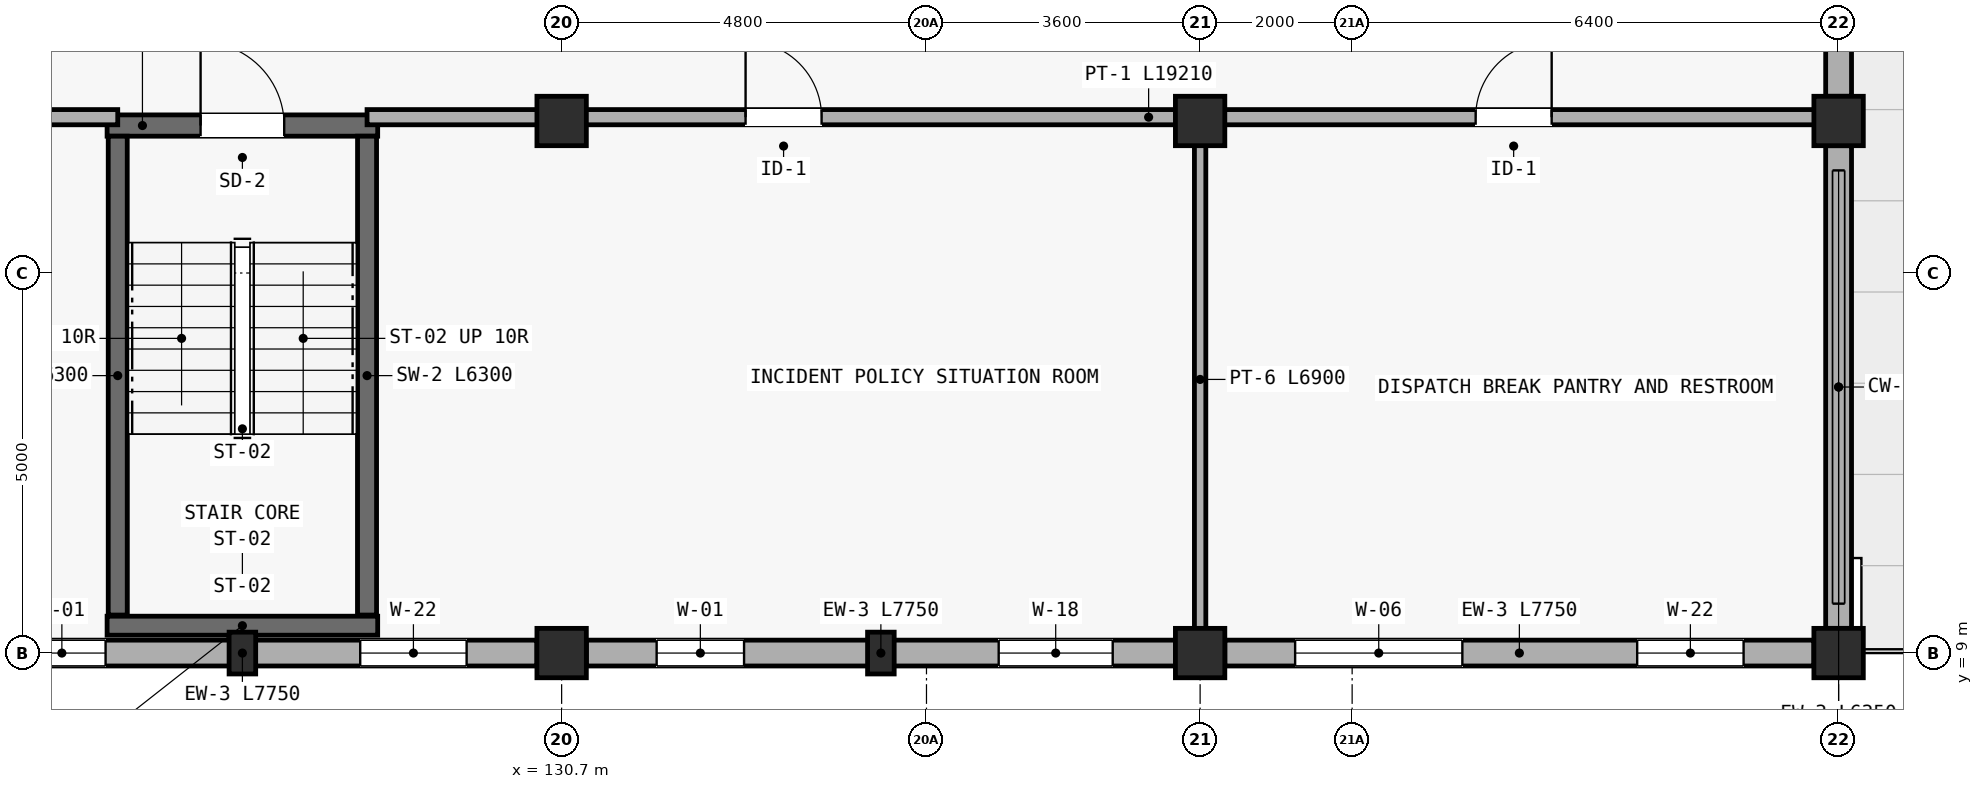
"""IFC4 building model, lengths in metres.
Left out: names, types, materials, properties, quantities, classifications, styles, units other than length and angle.
Written with IfcOpenShell. Run it as: python <this file> out.ifc"""

import sys

from ifc_helpers import new_model, si_unit, direction, frame, frame_2d, origin, origin_2d, place, context, subcontext, project, spatial, rectangle, extrude, element, fill, save


model = new_model("IFC4")
c1 = context("Model", 3, precision=1e-05, world=origin(), true_north=direction((0.0, 1.0)))
c2 = subcontext(c1, "Body", "Model", "MODEL_VIEW")
j1 = project(units=[si_unit("LENGTHUNIT", "METRE"), si_unit("PLANEANGLEUNIT", "RADIAN")], contexts=[c1])
p1 = place(None, origin())
s1 = spatial("IfcSite", under=j1, at=p1, CompositionType="ELEMENT")
p2 = place(p1, origin())
s2 = spatial("IfcBuilding", under=s1, at=p2, CompositionType="ELEMENT")
p3 = place(p2, frame((0.0, 0.0, 9.3)))
s3 = spatial("IfcBuildingStorey", under=s2, at=p3, CompositionType="ELEMENT", Elevation=9.3)
for number, where, z_axis, x_axis in (
    (1, (130.7, 9.0, 0.0), (0.0, 0.0, 1.0), (1.0, 0.0, 0.0)),
    (2, (130.7, 16.0, 0.0), (0.0, 0.0, 1.0), (1.0, 0.0, 0.0)),
    (3, (139.1, 9.0, 0.0), (0.0, 0.0, 1.0), (1.0, 0.0, 0.0)),
    (4, (139.1, 16.0, 0.0), (0.0, 0.0, 1.0), (1.0, 0.0, 0.0)),
    (5, (147.5, 9.0, 0.0), (0.0, 0.0, 1.0), (1.0, 0.0, 0.0)),
    (6, (147.5, 16.0, 0.0), (0.0, 0.0, 1.0), (1.0, 0.0, 0.0)),
):
    element("IfcColumn", number, at=place(p3, frame(where, z_axis=z_axis, x_axis=x_axis)), inside=s3, PredefinedType="COLUMN", context=c2, shape_type="SweptSolid", body=[
        extrude(rectangle(XDim=0.65, YDim=0.65, at=origin_2d()), origin(), (0.0, 0.0, 1.0), 3.45),
    ])
for number, where, z_axis, x_axis in (
    (7, (126.5, 9.0, 0.0), (0.0, 0.0, 1.0), (1.0, 0.0, 0.0)),
    (8, (134.9, 9.0, 0.0), (0.0, 0.0, 1.0), (1.0, 0.0, 0.0)),
):
    element("IfcColumn", number, at=place(p3, frame(where, z_axis=z_axis, x_axis=x_axis)), inside=s3, PredefinedType="PILASTER", context=c2, shape_type="SweptSolid", body=[
        extrude(rectangle(XDim=0.35, YDim=0.55, at=origin_2d()), origin(), (0.0, 0.0, 1.0), 3.45),
    ])
p4 = place(p3, frame((122.625, 9.0, 0.0), z_axis=(0.0, 0.0, 1.0), x_axis=(1.0, 0.0, 0.0)))
e9 = element("IfcWall", 9, at=p4, inside=s3, PredefinedType="STANDARD", context=c2, shape_type="SweptSolid", body=[
    extrude(rectangle(XDim=7.75, YDim=0.34, at=frame_2d((3.875, 0.0))), origin(), (0.0, 0.0, 1.0), 2.69),
])
p5 = place(p4, frame((0.925, 0.0, 0.75)))
e10 = element("IfcOpeningElement", 10, at=p5, cuts=e9, PredefinedType="OPENING", context=c2, shape_type="SweptSolid", body=[
    extrude(rectangle(XDim=1.15, YDim=1.45, at=frame_2d((0.575, 0.725))), frame((0.0, 0.18, 0.0), z_axis=(0.0, -1.0, 0.0), x_axis=(1.0, 0.0, 0.0)), (0.0, 0.0, 1.0), 0.36),
])
p6 = place(p4, frame((5.425, 0.0, 0.75)))
e11 = element("IfcOpeningElement", 11, at=p6, cuts=e9, PredefinedType="OPENING", context=c2, shape_type="SweptSolid", body=[
    extrude(rectangle(XDim=1.4, YDim=1.45, at=frame_2d((0.7, 0.725))), frame((0.0, 0.18, 0.0), z_axis=(0.0, -1.0, 0.0), x_axis=(1.0, 0.0, 0.0)), (0.0, 0.0, 1.0), 0.36),
])
p7 = place(p3, frame((131.025, 9.0, 0.0), z_axis=(0.0, 0.0, 1.0), x_axis=(1.0, 0.0, 0.0)))
e12 = element("IfcWall", 12, at=p7, inside=s3, PredefinedType="STANDARD", context=c2, shape_type="SweptSolid", body=[
    extrude(rectangle(XDim=7.75, YDim=0.34, at=frame_2d((3.875, 0.0))), origin(), (0.0, 0.0, 1.0), 2.69),
])
p8 = place(p7, frame((0.925, 0.0, 0.75)))
e13 = element("IfcOpeningElement", 13, at=p8, cuts=e12, PredefinedType="OPENING", context=c2, shape_type="SweptSolid", body=[
    extrude(rectangle(XDim=1.15, YDim=1.45, at=frame_2d((0.575, 0.725))), frame((0.0, 0.18, 0.0), z_axis=(0.0, -1.0, 0.0), x_axis=(1.0, 0.0, 0.0)), (0.0, 0.0, 1.0), 0.36),
])
p9 = place(p7, frame((5.425, 0.0, 0.75)))
e14 = element("IfcOpeningElement", 14, at=p9, cuts=e12, PredefinedType="OPENING", context=c2, shape_type="SweptSolid", body=[
    extrude(rectangle(XDim=1.5, YDim=1.4, at=frame_2d((0.75, 0.7))), frame((0.0, 0.18, 0.0), z_axis=(0.0, -1.0, 0.0), x_axis=(1.0, 0.0, 0.0)), (0.0, 0.0, 1.0), 0.36),
])
p10 = place(p3, frame((139.425, 9.0, 0.0), z_axis=(0.0, 0.0, 1.0), x_axis=(1.0, 0.0, 0.0)))
e15 = element("IfcWall", 15, at=p10, inside=s3, PredefinedType="STANDARD", context=c2, shape_type="SweptSolid", body=[
    extrude(rectangle(XDim=7.75, YDim=0.34, at=frame_2d((3.875, 0.0))), origin(), (0.0, 0.0, 1.0), 2.69),
])
p11 = place(p10, frame((0.925, 0.0, 0.75)))
e16 = element("IfcOpeningElement", 16, at=p11, cuts=e15, PredefinedType="OPENING", context=c2, shape_type="SweptSolid", body=[
    extrude(rectangle(XDim=2.2, YDim=1.45, at=frame_2d((1.1, 0.725))), frame((0.0, 0.18, 0.0), z_axis=(0.0, -1.0, 0.0), x_axis=(1.0, 0.0, 0.0)), (0.0, 0.0, 1.0), 0.36),
])
p12 = place(p10, frame((5.425, 0.0, 0.75)))
e17 = element("IfcOpeningElement", 17, at=p12, cuts=e15, PredefinedType="OPENING", context=c2, shape_type="SweptSolid", body=[
    extrude(rectangle(XDim=1.4, YDim=1.45, at=frame_2d((0.7, 0.725))), frame((0.0, 0.18, 0.0), z_axis=(0.0, -1.0, 0.0), x_axis=(1.0, 0.0, 0.0)), (0.0, 0.0, 1.0), 0.36),
])
p13 = place(p3, frame((147.5, 9.325, 0.0), z_axis=(0.0, 0.0, 1.0), x_axis=(0.0, 1.0, 0.0)))
e18 = element("IfcWall", 18, at=p13, inside=s3, PredefinedType="STANDARD", context=c2, shape_type="SweptSolid", body=[
    extrude(rectangle(XDim=6.35, YDim=0.34, at=frame_2d((3.175, 0.0))), origin(), (0.0, 0.0, 1.0), 2.75),
])
p14 = place(p3, frame((147.5, 16.325, 0.0), z_axis=(0.0, 0.0, 1.0), x_axis=(0.0, 1.0, 0.0)))
e19 = element("IfcWall", 19, at=p14, inside=s3, PredefinedType="STANDARD", context=c2, shape_type="SweptSolid", body=[
    extrude(rectangle(XDim=7.85, YDim=0.34, at=frame_2d((3.925, 0.0))), origin(), (0.0, 0.0, 1.0), 2.75),
])
p15 = place(p14, frame((0.775, 0.0, 0.0)))
e20 = element("IfcOpeningElement", 20, at=p15, cuts=e19, PredefinedType="OPENING", context=c2, shape_type="SweptSolid", body=[
    extrude(rectangle(XDim=1.08, YDim=2.1, at=frame_2d((0.54, 1.05))), frame((0.0, 0.18, 0.0), z_axis=(0.0, -1.0, 0.0), x_axis=(1.0, 0.0, 0.0)), (0.0, 0.0, 1.0), 0.36),
])
p16 = place(p14, frame((3.925, 0.0, 0.75)))
e21 = element("IfcOpeningElement", 21, at=p16, cuts=e19, PredefinedType="OPENING", context=c2, shape_type="SweptSolid", body=[
    extrude(rectangle(XDim=1.75, YDim=1.55, at=frame_2d((0.875, 0.775))), frame((0.0, 0.18, 0.0), z_axis=(0.0, -1.0, 0.0), x_axis=(1.0, 0.0, 0.0)), (0.0, 0.0, 1.0), 0.36),
])
p17 = place(p3, frame((124.72, 15.94, 0.0), z_axis=(0.0, 0.0, 1.0), x_axis=(1.0, 0.0, 0.0)))
e22 = element("IfcWall", 22, at=p17, inside=s3, PredefinedType="SHEAR", context=c2, shape_type="SweptSolid", body=[
    extrude(rectangle(XDim=3.56, YDim=0.28, at=frame_2d((1.78, 0.0))), origin(), (0.0, 0.0, 1.0), 3.2),
])
p18 = place(p17, frame((1.23, 0.0, 0.0)))
e23 = element("IfcOpeningElement", 23, at=p18, cuts=e22, PredefinedType="OPENING", context=c2, shape_type="SweptSolid", body=[
    extrude(rectangle(XDim=1.1, YDim=2.15, at=frame_2d((0.55, 1.075))), frame((0.0, 0.15, 0.0), z_axis=(0.0, -1.0, 0.0), x_axis=(1.0, 0.0, 0.0)), (0.0, 0.0, 1.0), 0.3),
])
p19 = place(p3, frame((128.28, 9.36, 0.0), z_axis=(0.0, 0.0, 1.0), x_axis=(-1.0, 0.0, 0.0)))
e24 = element("IfcWall", 24, at=p19, inside=s3, PredefinedType="SHEAR", context=c2, shape_type="SweptSolid", body=[
    extrude(rectangle(XDim=3.56, YDim=0.25, at=frame_2d((1.78, 0.0))), origin(), (0.0, 0.0, 1.0), 3.2),
])
for number, where, z_axis, x_axis in (
    (25, (124.86, 15.8, 0.0), (0.0, 0.0, 1.0), (0.0, -1.0, 0.0)),
    (26, (128.14, 9.5, 0.0), (0.0, 0.0, 1.0), (0.0, 1.0, 0.0)),
):
    element("IfcWall", number, at=place(p3, frame(where, z_axis=z_axis, x_axis=x_axis)), inside=s3, PredefinedType="SHEAR", context=c2, shape_type="SweptSolid", body=[
        extrude(rectangle(XDim=6.3, YDim=0.25, at=frame_2d((3.15, 0.0))), origin(), (0.0, 0.0, 1.0), 3.2),
    ])
p20 = place(p3, frame((121.13, 16.05, 0.0), z_axis=(0.0, 0.0, 1.0), x_axis=(1.0, 0.0, 0.0)))
e27 = element("IfcWall", 27, at=p20, inside=s3, PredefinedType="PARTITIONING", context=c2, shape_type="SweptSolid", body=[
    extrude(rectangle(XDim=3.73, YDim=0.2, at=frame_2d((1.865, 0.0))), origin(), (0.0, 0.0, 1.0), 2.7),
])
p21 = place(p3, frame((128.14, 16.05, 0.0), z_axis=(0.0, 0.0, 1.0), x_axis=(1.0, 0.0, 0.0)))
e28 = element("IfcWall", 28, at=p21, inside=s3, PredefinedType="PARTITIONING", context=c2, shape_type="SweptSolid", body=[
    extrude(rectangle(XDim=10.96, YDim=0.2, at=frame_2d((5.48, 0.0))), origin(), (0.0, 0.0, 1.0), 2.7),
])
p22 = place(p21, frame((4.98, 0.0, 0.0)))
e29 = element("IfcOpeningElement", 29, at=p22, cuts=e28, PredefinedType="OPENING", context=c2, shape_type="SweptSolid", body=[
    extrude(rectangle(XDim=1.0, YDim=2.12, at=frame_2d((0.5, 1.06))), frame((0.0, 0.11, 0.0), z_axis=(0.0, -1.0, 0.0), x_axis=(1.0, 0.0, 0.0)), (0.0, 0.0, 1.0), 0.22),
])
p23 = place(p3, frame((139.1, 16.05, 0.0), z_axis=(0.0, 0.0, 1.0), x_axis=(1.0, 0.0, 0.0)))
e30 = element("IfcWall", 30, at=p23, inside=s3, PredefinedType="PARTITIONING", context=c2, shape_type="SweptSolid", body=[
    extrude(rectangle(XDim=8.25, YDim=0.2, at=frame_2d((4.125, 0.0))), origin(), (0.0, 0.0, 1.0), 2.7),
])
p24 = place(p23, frame((3.625, 0.0, 0.0)))
e31 = element("IfcOpeningElement", 31, at=p24, cuts=e30, PredefinedType="OPENING", context=c2, shape_type="SweptSolid", body=[
    extrude(rectangle(XDim=1.0, YDim=2.12, at=frame_2d((0.5, 1.06))), frame((0.0, 0.11, 0.0), z_axis=(0.0, -1.0, 0.0), x_axis=(1.0, 0.0, 0.0)), (0.0, 0.0, 1.0), 0.22),
])
p25 = place(p3, frame((139.1, 9.15, 0.0), z_axis=(0.0, 0.0, 1.0), x_axis=(0.0, 1.0, 0.0)))
e32 = element("IfcWall", 32, at=p25, inside=s3, PredefinedType="PARTITIONING", context=c2, shape_type="SweptSolid", body=[
    extrude(rectangle(XDim=6.9, YDim=0.15, at=frame_2d((3.45, 0.0))), origin(), (0.0, 0.0, 1.0), 2.7),
])
p26 = place(p5, origin())
e33 = element("IfcWindow", 33, at=p26, inside=s3, PartitioningType="SINGLE_PANEL", PredefinedType="WINDOW", context=c2, shape_type="SweptSolid", body=[
    extrude(rectangle(XDim=1.15, YDim=1.45, at=frame_2d((0.575, 0.725))), frame((0.0, 0.03, 0.0), z_axis=(0.0, -1.0, 0.0), x_axis=(1.0, 0.0, 0.0)), (0.0, 0.0, 1.0), 0.06),
])
fill(e10, e33)
p27 = place(p6, origin())
e34 = element("IfcWindow", 34, at=p27, inside=s3, PartitioningType="DOUBLE_PANEL_VERTICAL", PredefinedType="WINDOW", context=c2, shape_type="SweptSolid", body=[
    extrude(rectangle(XDim=1.4, YDim=1.45, at=frame_2d((0.7, 0.725))), frame((0.0, 0.03, 0.0), z_axis=(0.0, -1.0, 0.0), x_axis=(1.0, 0.0, 0.0)), (0.0, 0.0, 1.0), 0.06),
])
fill(e11, e34)
p28 = place(p8, origin())
e35 = element("IfcWindow", 35, at=p28, inside=s3, PartitioningType="SINGLE_PANEL", PredefinedType="WINDOW", context=c2, shape_type="SweptSolid", body=[
    extrude(rectangle(XDim=1.15, YDim=1.45, at=frame_2d((0.575, 0.725))), frame((0.0, 0.03, 0.0), z_axis=(0.0, -1.0, 0.0), x_axis=(1.0, 0.0, 0.0)), (0.0, 0.0, 1.0), 0.06),
])
fill(e13, e35)
p29 = place(p9, origin())
e36 = element("IfcWindow", 36, at=p29, inside=s3, PartitioningType="DOUBLE_PANEL_VERTICAL", PredefinedType="WINDOW", context=c2, shape_type="SweptSolid", body=[
    extrude(rectangle(XDim=1.5, YDim=1.4, at=frame_2d((0.75, 0.7))), frame((0.0, 0.03, 0.0), z_axis=(0.0, -1.0, 0.0), x_axis=(1.0, 0.0, 0.0)), (0.0, 0.0, 1.0), 0.06),
])
fill(e14, e36)
p30 = place(p11, origin())
e37 = element("IfcWindow", 37, at=p30, inside=s3, PartitioningType="TRIPLE_PANEL_VERTICAL", PredefinedType="WINDOW", context=c2, shape_type="SweptSolid", body=[
    extrude(rectangle(XDim=2.2, YDim=1.45, at=frame_2d((1.1, 0.725))), frame((0.0, 0.03, 0.0), z_axis=(0.0, -1.0, 0.0), x_axis=(1.0, 0.0, 0.0)), (0.0, 0.0, 1.0), 0.06),
])
fill(e16, e37)
p31 = place(p12, origin())
e38 = element("IfcWindow", 38, at=p31, inside=s3, PartitioningType="DOUBLE_PANEL_VERTICAL", PredefinedType="WINDOW", context=c2, shape_type="SweptSolid", body=[
    extrude(rectangle(XDim=1.4, YDim=1.45, at=frame_2d((0.7, 0.725))), frame((0.0, 0.03, 0.0), z_axis=(0.0, -1.0, 0.0), x_axis=(1.0, 0.0, 0.0)), (0.0, 0.0, 1.0), 0.06),
])
fill(e17, e38)
p32 = place(p18, origin())
e39 = element("IfcDoor", 39, at=p32, inside=s3, OperationType="SINGLE_SWING_LEFT", PredefinedType="DOOR", context=c2, shape_type="SweptSolid", body=[
    extrude(rectangle(XDim=1.1, YDim=2.15, at=frame_2d((0.55, 1.075))), frame((0.0, 0.025, 0.0), z_axis=(0.0, -1.0, 0.0), x_axis=(1.0, 0.0, 0.0)), (0.0, 0.0, 1.0), 0.05),
])
fill(e23, e39)
p33 = place(p22, origin())
e40 = element("IfcDoor", 40, at=p33, inside=s3, OperationType="SINGLE_SWING_LEFT", PredefinedType="DOOR", context=c2, shape_type="SweptSolid", body=[
    extrude(rectangle(XDim=1.0, YDim=2.12, at=frame_2d((0.5, 1.06))), frame((0.0, 0.025, 0.0), z_axis=(0.0, -1.0, 0.0), x_axis=(1.0, 0.0, 0.0)), (0.0, 0.0, 1.0), 0.05),
])
fill(e29, e40)
p34 = place(p24, origin())
e41 = element("IfcDoor", 41, at=p34, inside=s3, OperationType="SINGLE_SWING_RIGHT", PredefinedType="DOOR", context=c2, shape_type="SweptSolid", body=[
    extrude(rectangle(XDim=1.0, YDim=2.12, at=frame_2d((0.5, 1.06))), frame((0.0, 0.025, 0.0), z_axis=(0.0, -1.0, 0.0), x_axis=(1.0, 0.0, 0.0)), (0.0, 0.0, 1.0), 0.05),
])
fill(e31, e41)
save(model, sys.argv[1])
